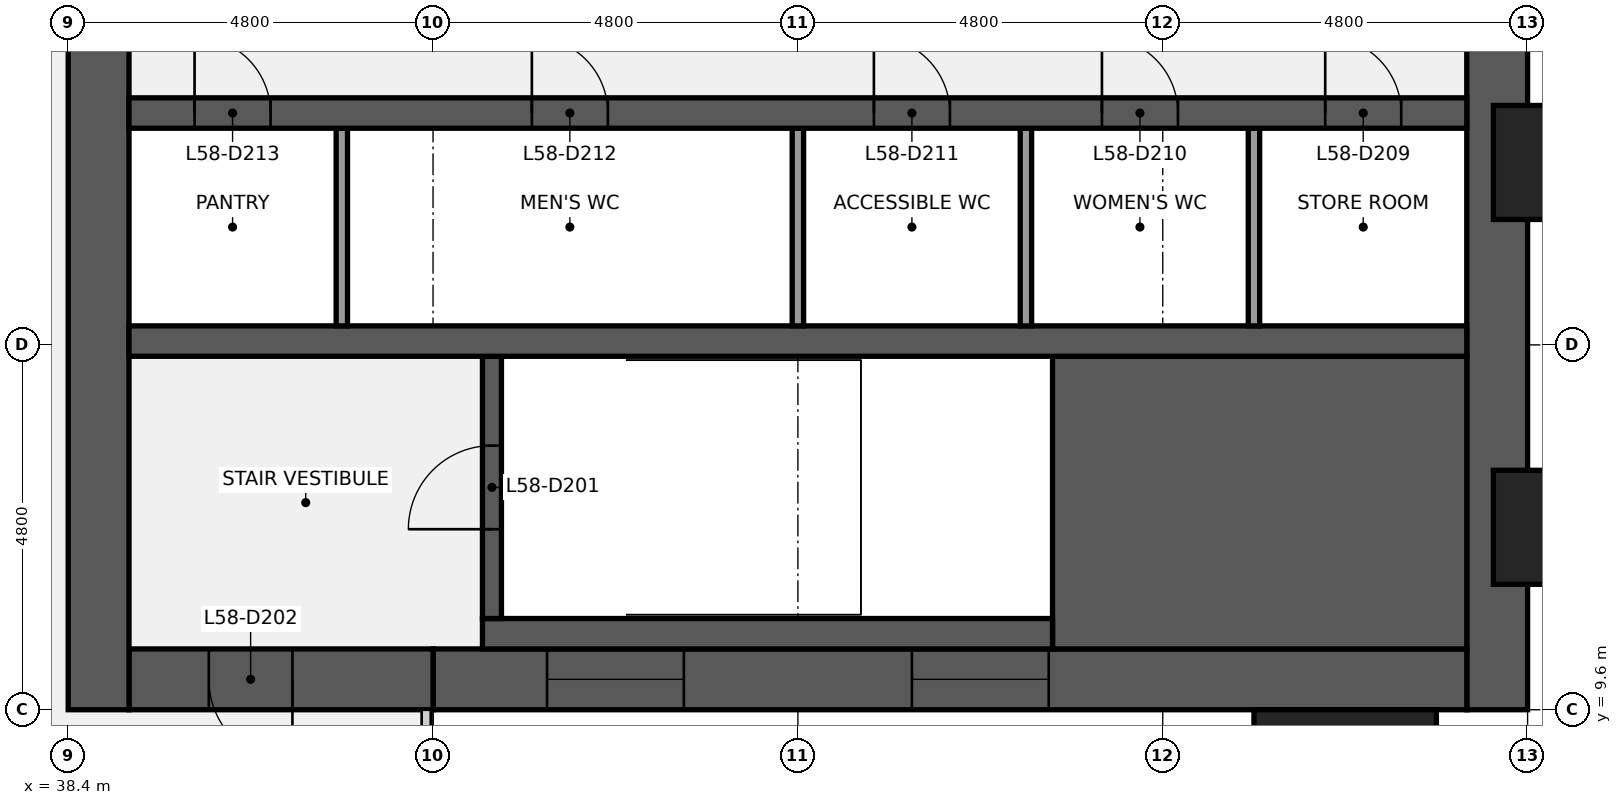
"""IFC4 building model, lengths in metres.
Left out: names, types, materials, properties, quantities, classifications, styles, units other than length and angle.
Written with IfcOpenShell. Run it as: python <this file> out.ifc"""

import sys

from ifc_helpers import new_model, si_unit, direction, frame, frame_2d, origin, origin_2d, place, context, subcontext, project, spatial, rectangle, extrude, element, fill, save


model = new_model("IFC4")
c1 = context("Model", 3, precision=1e-05, world=origin(), true_north=direction((0.0, 1.0)))
c2 = subcontext(c1, "Body", "Model", "MODEL_VIEW")
j1 = project(units=[si_unit("LENGTHUNIT", "METRE"), si_unit("PLANEANGLEUNIT", "RADIAN")], contexts=[c1])
p1 = place(None, origin())
s1 = spatial("IfcSite", under=j1, at=p1, CompositionType="ELEMENT")
p2 = place(p1, origin())
s2 = spatial("IfcBuilding", under=s1, at=p2, CompositionType="ELEMENT")
p3 = place(p2, frame((0.0, 0.0, 261.2)))
s3 = spatial("IfcBuildingStorey", under=s2, at=p3, CompositionType="ELEMENT", Elevation=261.2)
p4 = place(p3, frame((57.2, 38.4, 0.0), z_axis=(0.0, 0.0, 1.0), x_axis=(0.0, -1.0, 0.0)))
e1 = element("IfcWall", 1, at=p4, inside=s3, PredefinedType="SHEAR", context=c2, shape_type="SweptSolid", body=[
    extrude(rectangle(XDim=28.8, YDim=0.8, at=frame_2d((14.4, 0.0))), origin(), (0.0, 0.0, 1.0), 3.7),
])
p5 = place(p4, frame((18.45, 0.0, 0.9)))
e2 = element("IfcOpeningElement", 2, at=p5, cuts=e1, PredefinedType="OPENING", context=c2, shape_type="SweptSolid", body=[
    extrude(rectangle(XDim=1.5, YDim=1.5, at=frame_2d((0.75, 0.75))), frame((0.0, 0.41, 0.0), z_axis=(0.0, -1.0, 0.0), x_axis=(1.0, 0.0, 0.0)), (0.0, 0.0, 1.0), 0.82),
])
p6 = place(p4, frame((8.85, 0.0, 0.9)))
e3 = element("IfcOpeningElement", 3, at=p6, cuts=e1, PredefinedType="OPENING", context=c2, shape_type="SweptSolid", body=[
    extrude(rectangle(XDim=1.5, YDim=1.5, at=frame_2d((0.75, 0.75))), frame((0.0, 0.41, 0.0), z_axis=(0.0, -1.0, 0.0), x_axis=(1.0, 0.0, 0.0)), (0.0, 0.0, 1.0), 0.82),
])
p7 = place(p3, frame((56.8, 10.0, 0.0), z_axis=(0.0, 0.0, 1.0), x_axis=(-1.0, 0.0, 0.0)))
e4 = element("IfcWall", 4, at=p7, inside=s3, PredefinedType="SHEAR", context=c2, shape_type="SweptSolid", body=[
    extrude(rectangle(XDim=13.6, YDim=0.8, at=frame_2d((6.8, 0.0))), origin(), (0.0, 0.0, 1.0), 3.7),
])
p8 = place(p7, frame((5.5, 0.0, 0.9)))
e5 = element("IfcOpeningElement", 5, at=p8, cuts=e4, PredefinedType="OPENING", context=c2, shape_type="SweptSolid", body=[
    extrude(rectangle(XDim=1.8, YDim=1.5, at=frame_2d((0.9, 0.75))), frame((0.0, 0.41, 0.0), z_axis=(0.0, -1.0, 0.0), x_axis=(1.0, 0.0, 0.0)), (0.0, 0.0, 1.0), 0.82),
])
p9 = place(p7, frame((10.3, 0.0, 0.9)))
e6 = element("IfcOpeningElement", 6, at=p9, cuts=e4, PredefinedType="OPENING", context=c2, shape_type="SweptSolid", body=[
    extrude(rectangle(XDim=1.8, YDim=1.5, at=frame_2d((0.9, 0.75))), frame((0.0, 0.41, 0.0), z_axis=(0.0, -1.0, 0.0), x_axis=(1.0, 0.0, 0.0)), (0.0, 0.0, 1.0), 0.82),
])
p10 = place(p3, frame((43.2, 10.0, 0.0), z_axis=(0.0, 0.0, 1.0), x_axis=(-1.0, 0.0, 0.0)))
e7 = element("IfcWall", 7, at=p10, inside=s3, PredefinedType="SHEAR", context=c2, shape_type="SweptSolid", body=[
    extrude(rectangle(XDim=4.0, YDim=0.8, at=frame_2d((2.0, 0.0))), origin(), (0.0, 0.0, 1.0), 3.7),
])
p11 = place(p10, frame((1.85, 0.0, 0.0)))
e8 = element("IfcOpeningElement", 8, at=p11, cuts=e7, PredefinedType="OPENING", context=c2, shape_type="SweptSolid", body=[
    extrude(rectangle(XDim=1.1, YDim=2.1, at=frame_2d((0.55, 1.05))), frame((0.0, 0.41, 0.0), z_axis=(0.0, -1.0, 0.0), x_axis=(1.0, 0.0, 0.0)), (0.0, 0.0, 1.0), 0.82),
])
p12 = place(p3, frame((38.8, 9.6, 0.0), z_axis=(0.0, 0.0, 1.0), x_axis=(0.0, 1.0, 0.0)))
e9 = element("IfcWall", 9, at=p12, inside=s3, PredefinedType="SHEAR", context=c2, shape_type="SweptSolid", body=[
    extrude(rectangle(XDim=28.8, YDim=0.8, at=frame_2d((14.4, 0.0))), origin(), (0.0, 0.0, 1.0), 3.7),
])
p13 = place(p12, frame((8.7, 0.0, 0.0)))
e10 = element("IfcOpeningElement", 10, at=p13, cuts=e9, PredefinedType="OPENING", context=c2, shape_type="SweptSolid", body=[
    extrude(rectangle(XDim=1.8, YDim=2.1, at=frame_2d((0.9, 1.05))), frame((0.0, 0.41, 0.0), z_axis=(0.0, -1.0, 0.0), x_axis=(1.0, 0.0, 0.0)), (0.0, 0.0, 1.0), 0.82),
])
p14 = place(p12, frame((18.3, 0.0, 0.0)))
e11 = element("IfcOpeningElement", 11, at=p14, cuts=e9, PredefinedType="OPENING", context=c2, shape_type="SweptSolid", body=[
    extrude(rectangle(XDim=1.8, YDim=2.1, at=frame_2d((0.9, 1.05))), frame((0.0, 0.41, 0.0), z_axis=(0.0, -1.0, 0.0), x_axis=(1.0, 0.0, 0.0)), (0.0, 0.0, 1.0), 0.82),
])
p15 = place(p3, frame((51.35, 12.325, 0.0), z_axis=(0.0, 0.0, 1.0), x_axis=(1.0, 0.0, 0.0)))
e12 = element("IfcWall", 12, at=p15, inside=s3, PredefinedType="SHEAR", context=c2, shape_type="SweptSolid", body=[
    extrude(rectangle(XDim=5.45, YDim=3.85, at=frame_2d((2.725, 0.0))), origin(), (0.0, 0.0, 1.0), 3.7),
])
p16 = place(p3, frame((43.85, 10.6, 0.0), z_axis=(0.0, 0.0, 1.0), x_axis=(1.0, 0.0, 0.0)))
e13 = element("IfcWall", 13, at=p16, inside=s3, PredefinedType="SHEAR", context=c2, shape_type="SweptSolid", body=[
    extrude(rectangle(XDim=7.5, YDim=0.4, at=frame_2d((3.75, 0.0))), origin(), (0.0, 0.0, 1.0), 3.7),
])
p17 = place(p3, frame((43.975, 10.8, 0.0), z_axis=(0.0, 0.0, 1.0), x_axis=(0.0, 1.0, 0.0)))
e14 = element("IfcWall", 14, at=p17, inside=s3, PredefinedType="SHEAR", context=c2, shape_type="SweptSolid", body=[
    extrude(rectangle(XDim=3.45, YDim=0.25, at=frame_2d((1.725, 0.0))), origin(), (0.0, 0.0, 1.0), 3.7),
])
p18 = place(p17, frame((1.175, 0.0, 0.0)))
e15 = element("IfcOpeningElement", 15, at=p18, cuts=e14, PredefinedType="OPENING", context=c2, shape_type="SweptSolid", body=[
    extrude(rectangle(XDim=1.1, YDim=2.1, at=frame_2d((0.55, 1.05))), frame((0.0, 0.135, 0.0), z_axis=(0.0, -1.0, 0.0), x_axis=(1.0, 0.0, 0.0)), (0.0, 0.0, 1.0), 0.27),
])
p19 = place(p3, frame((39.2, 14.45, 0.0), z_axis=(0.0, 0.0, 1.0), x_axis=(1.0, 0.0, 0.0)))
e16 = element("IfcWall", 16, at=p19, inside=s3, PredefinedType="SHEAR", context=c2, shape_type="SweptSolid", body=[
    extrude(rectangle(XDim=17.6, YDim=0.4, at=frame_2d((8.8, 0.0))), origin(), (0.0, 0.0, 1.0), 3.7),
])
for number, where, z_axis, x_axis in (
    (17, (54.0, 14.65, 0.0), (0.0, 0.0, 1.0), (0.0, 1.0, 0.0)),
    (18, (51.0, 14.65, 0.0), (0.0, 0.0, 1.0), (0.0, 1.0, 0.0)),
    (19, (48.0, 14.65, 0.0), (0.0, 0.0, 1.0), (0.0, 1.0, 0.0)),
    (20, (42.0, 14.65, 0.0), (0.0, 0.0, 1.0), (0.0, 1.0, 0.0)),
):
    element("IfcWall", number, at=place(p3, frame(where, z_axis=z_axis, x_axis=x_axis)), inside=s3, PredefinedType="PARTITIONING", context=c2, shape_type="SweptSolid", body=[
        extrude(rectangle(XDim=2.6, YDim=0.15, at=frame_2d((1.3, 0.0))), origin(), (0.0, 0.0, 1.0), 3.7),
    ])
p20 = place(p3, frame((39.2, 17.45, 0.0), z_axis=(0.0, 0.0, 1.0), x_axis=(1.0, 0.0, 0.0)))
e21 = element("IfcWall", 21, at=p20, inside=s3, PredefinedType="SHEAR", context=c2, shape_type="SweptSolid", body=[
    extrude(rectangle(XDim=17.6, YDim=0.4, at=frame_2d((8.8, 0.0))), origin(), (0.0, 0.0, 1.0), 3.7),
])
p21 = place(p20, frame((15.738, 0.0, 0.0)))
e22 = element("IfcOpeningElement", 22, at=p21, cuts=e21, PredefinedType="OPENING", context=c2, shape_type="SweptSolid", body=[
    extrude(rectangle(XDim=1.0, YDim=2.1, at=frame_2d((0.5, 1.05))), frame((0.0, 0.21, 0.0), z_axis=(0.0, -1.0, 0.0), x_axis=(1.0, 0.0, 0.0)), (0.0, 0.0, 1.0), 0.42),
])
p22 = place(p20, frame((12.8, 0.0, 0.0)))
e23 = element("IfcOpeningElement", 23, at=p22, cuts=e21, PredefinedType="OPENING", context=c2, shape_type="SweptSolid", body=[
    extrude(rectangle(XDim=1.0, YDim=2.1, at=frame_2d((0.5, 1.05))), frame((0.0, 0.21, 0.0), z_axis=(0.0, -1.0, 0.0), x_axis=(1.0, 0.0, 0.0)), (0.0, 0.0, 1.0), 0.42),
])
p23 = place(p20, frame((9.8, 0.0, 0.0)))
e24 = element("IfcOpeningElement", 24, at=p23, cuts=e21, PredefinedType="OPENING", context=c2, shape_type="SweptSolid", body=[
    extrude(rectangle(XDim=1.0, YDim=2.1, at=frame_2d((0.5, 1.05))), frame((0.0, 0.21, 0.0), z_axis=(0.0, -1.0, 0.0), x_axis=(1.0, 0.0, 0.0)), (0.0, 0.0, 1.0), 0.42),
])
p24 = place(p20, frame((5.3, 0.0, 0.0)))
e25 = element("IfcOpeningElement", 25, at=p24, cuts=e21, PredefinedType="OPENING", context=c2, shape_type="SweptSolid", body=[
    extrude(rectangle(XDim=1.0, YDim=2.1, at=frame_2d((0.5, 1.05))), frame((0.0, 0.21, 0.0), z_axis=(0.0, -1.0, 0.0), x_axis=(1.0, 0.0, 0.0)), (0.0, 0.0, 1.0), 0.42),
])
p25 = place(p20, frame((0.863, 0.0, 0.0)))
e26 = element("IfcOpeningElement", 26, at=p25, cuts=e21, PredefinedType="OPENING", context=c2, shape_type="SweptSolid", body=[
    extrude(rectangle(XDim=1.0, YDim=2.1, at=frame_2d((0.5, 1.05))), frame((0.0, 0.21, 0.0), z_axis=(0.0, -1.0, 0.0), x_axis=(1.0, 0.0, 0.0)), (0.0, 0.0, 1.0), 0.42),
])
for number, where, z_axis, x_axis in (
    (27, (55.2, 8.85, 0.0), (0.0, 0.0, 1.0), (1.0, 0.0, 0.0)),
    (28, (58.35, 12.0, 0.0), (0.0, 0.0, 1.0), (0.0, 1.0, 0.0)),
    (29, (58.35, 16.8, 0.0), (0.0, 0.0, 1.0), (0.0, 1.0, 0.0)),
):
    element("IfcColumn", number, at=place(p3, frame(where, z_axis=z_axis, x_axis=x_axis)), inside=s3, PredefinedType="PILASTER", context=c2, shape_type="SweptSolid", body=[
        extrude(rectangle(XDim=2.4, YDim=1.5, at=origin_2d()), origin(), (0.0, 0.0, 1.0), 4.0),
    ])
p26 = place(p18, origin())
e30 = element("IfcDoor", 30, at=p26, inside=s3, OperationType="SINGLE_SWING_LEFT", PredefinedType="DOOR", context=c2, shape_type="SweptSolid", body=[
    extrude(rectangle(XDim=1.1, YDim=2.1, at=frame_2d((0.55, 1.05))), frame((0.0, 0.025, 0.0), z_axis=(0.0, -1.0, 0.0), x_axis=(1.0, 0.0, 0.0)), (0.0, 0.0, 1.0), 0.05),
])
fill(e15, e30)
p27 = place(p11, origin())
e31 = element("IfcDoor", 31, at=p27, inside=s3, OperationType="SINGLE_SWING_LEFT", PredefinedType="DOOR", context=c2, shape_type="SweptSolid", body=[
    extrude(rectangle(XDim=1.1, YDim=2.1, at=frame_2d((0.55, 1.05))), frame((0.0, 0.025, 0.0), z_axis=(0.0, -1.0, 0.0), x_axis=(1.0, 0.0, 0.0)), (0.0, 0.0, 1.0), 0.05),
])
fill(e8, e31)
p28 = place(p21, origin())
e32 = element("IfcDoor", 32, at=p28, inside=s3, OperationType="SINGLE_SWING_LEFT", PredefinedType="DOOR", context=c2, shape_type="SweptSolid", body=[
    extrude(rectangle(XDim=1.0, YDim=2.1, at=frame_2d((0.5, 1.05))), frame((0.0, 0.025, 0.0), z_axis=(0.0, -1.0, 0.0), x_axis=(1.0, 0.0, 0.0)), (0.0, 0.0, 1.0), 0.05),
])
fill(e22, e32)
p29 = place(p22, origin())
e33 = element("IfcDoor", 33, at=p29, inside=s3, OperationType="SINGLE_SWING_LEFT", PredefinedType="DOOR", context=c2, shape_type="SweptSolid", body=[
    extrude(rectangle(XDim=1.0, YDim=2.1, at=frame_2d((0.5, 1.05))), frame((0.0, 0.025, 0.0), z_axis=(0.0, -1.0, 0.0), x_axis=(1.0, 0.0, 0.0)), (0.0, 0.0, 1.0), 0.05),
])
fill(e23, e33)
p30 = place(p23, origin())
e34 = element("IfcDoor", 34, at=p30, inside=s3, OperationType="SINGLE_SWING_LEFT", PredefinedType="DOOR", context=c2, shape_type="SweptSolid", body=[
    extrude(rectangle(XDim=1.0, YDim=2.1, at=frame_2d((0.5, 1.05))), frame((0.0, 0.025, 0.0), z_axis=(0.0, -1.0, 0.0), x_axis=(1.0, 0.0, 0.0)), (0.0, 0.0, 1.0), 0.05),
])
fill(e24, e34)
p31 = place(p24, origin())
e35 = element("IfcDoor", 35, at=p31, inside=s3, OperationType="SINGLE_SWING_LEFT", PredefinedType="DOOR", context=c2, shape_type="SweptSolid", body=[
    extrude(rectangle(XDim=1.0, YDim=2.1, at=frame_2d((0.5, 1.05))), frame((0.0, 0.025, 0.0), z_axis=(0.0, -1.0, 0.0), x_axis=(1.0, 0.0, 0.0)), (0.0, 0.0, 1.0), 0.05),
])
fill(e25, e35)
p32 = place(p25, origin())
e36 = element("IfcDoor", 36, at=p32, inside=s3, OperationType="SINGLE_SWING_LEFT", PredefinedType="DOOR", context=c2, shape_type="SweptSolid", body=[
    extrude(rectangle(XDim=1.0, YDim=2.1, at=frame_2d((0.5, 1.05))), frame((0.0, 0.025, 0.0), z_axis=(0.0, -1.0, 0.0), x_axis=(1.0, 0.0, 0.0)), (0.0, 0.0, 1.0), 0.05),
])
fill(e26, e36)
p33 = place(p8, origin())
e37 = element("IfcWindow", 37, at=p33, inside=s3, PartitioningType="SINGLE_PANEL", PredefinedType="WINDOW", context=c2, shape_type="SweptSolid", body=[
    extrude(rectangle(XDim=1.8, YDim=1.5, at=frame_2d((0.9, 0.75))), frame((0.0, 0.03, 0.0), z_axis=(0.0, -1.0, 0.0), x_axis=(1.0, 0.0, 0.0)), (0.0, 0.0, 1.0), 0.06),
])
fill(e5, e37)
p34 = place(p9, origin())
e38 = element("IfcWindow", 38, at=p34, inside=s3, PartitioningType="SINGLE_PANEL", PredefinedType="WINDOW", context=c2, shape_type="SweptSolid", body=[
    extrude(rectangle(XDim=1.8, YDim=1.5, at=frame_2d((0.9, 0.75))), frame((0.0, 0.03, 0.0), z_axis=(0.0, -1.0, 0.0), x_axis=(1.0, 0.0, 0.0)), (0.0, 0.0, 1.0), 0.06),
])
fill(e6, e38)
save(model, sys.argv[1])
